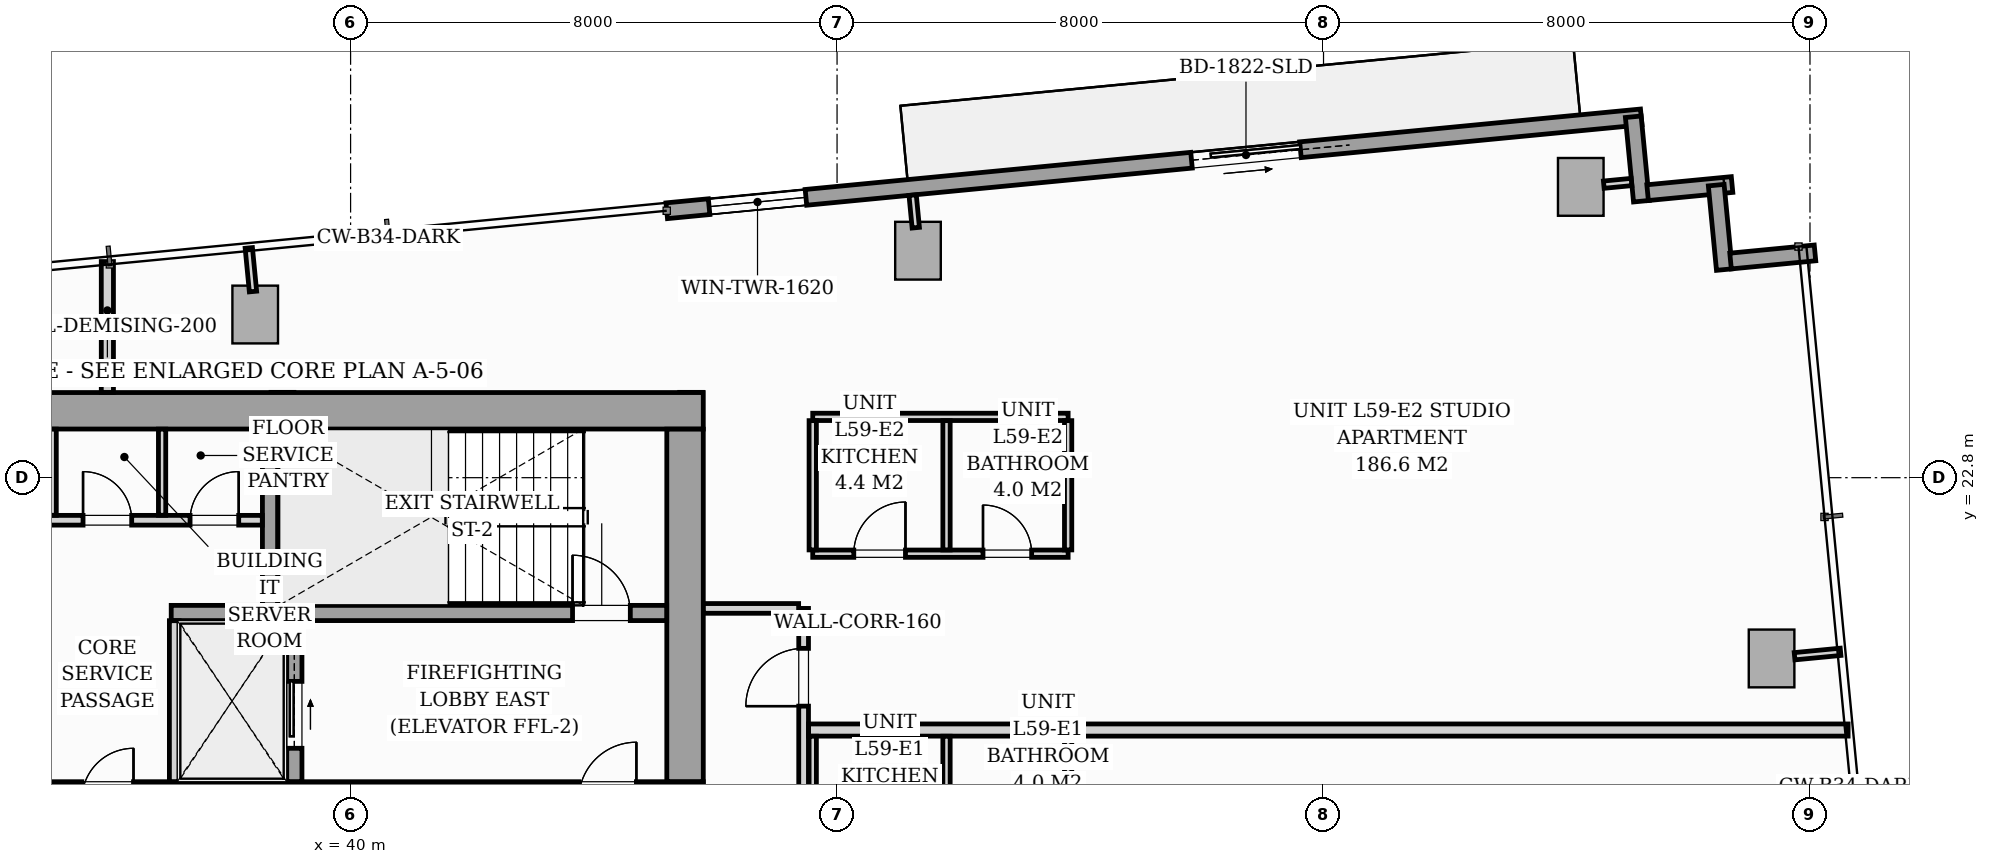
"""IFC4 building model, lengths in metres.
Left out: names, types, materials, properties, quantities, classifications, styles, units other than length and angle.
Written with IfcOpenShell. Run it as: python <this file> out.ifc"""

import sys

from ifc_helpers import new_model, si_unit, direction, frame, frame_2d, origin, origin_2d, place, context, subcontext, project, spatial, rectangle, i_section, extrude, source, transform, mapped, element, fill, save


model = new_model("IFC4")
c1 = context("Model", 3, precision=1e-05, world=origin(), true_north=direction((0.0, 1.0)))
c2 = subcontext(c1, "Body", "Model", "MODEL_VIEW")
j1 = project(units=[si_unit("LENGTHUNIT", "METRE"), si_unit("PLANEANGLEUNIT", "RADIAN")], contexts=[c1])
p1 = place(None, origin())
s1 = spatial("IfcSite", under=j1, at=p1, CompositionType="ELEMENT")
p2 = place(p1, origin())
s2 = spatial("IfcBuilding", under=s1, at=p2, CompositionType="ELEMENT")
p3 = place(p2, frame((0.0, 0.0, 205.0)))
s3 = spatial("IfcBuildingStorey", under=s2, at=p3, CompositionType="ELEMENT", Elevation=205.0)
m1 = source(origin(), c2, "Body", "SweptSolid", [
    extrude(i_section(OverallWidth=0.416, OverallDepth=0.446, WebThickness=0.039, FlangeThickness=0.063, FilletRadius=0.018, at=origin_2d()), origin(), (0.0, 0.0, 1.0), 3.196),
])
for number, where, z_axis, x_axis in (
    (1, (38.88, 24.0, 0.002), (0.0, 0.0, 1.0), (1.0, 0.0, 0.0)),
    (2, (45.6, 24.0, 0.002), (0.0, 0.0, 1.0), (1.0, 0.0, 0.0)),
):
    element("IfcColumn", number, at=place(p3, frame(where, z_axis=z_axis, x_axis=x_axis)), inside=s3, PredefinedType="PILASTER", context=c2, shape_type="MappedRepresentation", body=[
        mapped(m1, transform((0.0, 0.0, 0.0), scale=1.0)),
    ])
m2 = source(origin(), c2, "Body", "SweptSolid", [
    extrude(rectangle(XDim=0.75, YDim=0.95, at=origin_2d()), origin(), (0.0, 0.0, 1.0), 3.196),
])
for number, where, z_axis, x_axis in (
    (3, (38.431, 25.483, 0.002), (0.0, 0.0, 1.0), (0.995, 0.096, 0.0)),
    (4, (49.331, 26.533, 0.002), (0.0, 0.0, 1.0), (0.995, 0.096, 0.0)),
    (5, (60.23, 27.582, 0.002), (0.0, 0.0, 1.0), (0.995, 0.096, 0.0)),
    (6, (63.368, 19.827, 0.002), (0.0, 0.0, 1.0), (0.995, 0.096, 0.0)),
):
    element("IfcColumn", number, at=place(p3, frame(where, z_axis=z_axis, x_axis=x_axis)), inside=s3, PredefinedType="COLUMN", context=c2, shape_type="MappedRepresentation", body=[
        mapped(m2, transform((0.0, 0.0, 0.0), scale=1.0)),
    ])
p4 = place(p3, frame((45.199, 27.19, 0.0), z_axis=(0.0, 0.0, 1.0), x_axis=(0.995397074604, 0.095836652014, 0.0)))
e7 = element("IfcWall", 7, at=p4, inside=s3, PredefinedType="STANDARD", context=c2, shape_type="SweptSolid", body=[
    extrude(rectangle(XDim=16.1, YDim=0.26, at=frame_2d((8.05, 0.0))), origin(), (0.0, 0.0, 1.0), 2.94),
])
p5 = place(p4, frame((8.67, 0.0, 0.0)))
e8 = element("IfcOpeningElement", 8, at=p5, cuts=e7, PredefinedType="OPENING", context=c2, shape_type="SweptSolid", body=[
    extrude(rectangle(XDim=1.8, YDim=2.06, at=frame_2d((0.9, 1.03))), frame((0.0, 0.14, 0.0), z_axis=(0.0, -1.0, 0.0), x_axis=(1.0, 0.0, 0.0)), (0.0, 0.0, 1.0), 0.28),
])
p6 = place(p4, frame((0.7, 0.0, 0.65)))
e9 = element("IfcOpeningElement", 9, at=p6, cuts=e7, PredefinedType="OPENING", context=c2, shape_type="SweptSolid", body=[
    extrude(rectangle(XDim=1.6, YDim=1.5, at=frame_2d((0.8, 0.75))), frame((0.0, 0.14, 0.0), z_axis=(0.0, -1.0, 0.0), x_axis=(1.0, 0.0, 0.0)), (0.0, 0.0, 1.0), 0.28),
])
p7 = place(p3, frame((61.094, 28.735, 0.0), z_axis=(0.0, 0.0, 1.0), x_axis=(0.095742423056, -0.99540614245, 0.0)))
e10 = element("IfcWall", 10, at=p7, inside=s3, PredefinedType="STANDARD", context=c2, shape_type="SweptSolid", body=[
    extrude(rectangle(XDim=1.395, YDim=0.26, at=frame_2d((0.697, 0.0))), origin(), (0.0, 0.0, 1.0), 2.94),
])
p8 = place(p3, frame((61.33, 27.487, 0.0), z_axis=(0.0, 0.0, 1.0), x_axis=(0.995391056452, 0.09589913835, 0.0)))
e11 = element("IfcWall", 11, at=p8, inside=s3, PredefinedType="STANDARD", context=c2, shape_type="SweptSolid", body=[
    extrude(rectangle(XDim=1.395, YDim=0.26, at=frame_2d((0.698, 0.0))), origin(), (0.0, 0.0, 1.0), 2.94),
])
for number, where, z_axis, x_axis in (
    (12, (62.458, 27.611, 0.0), (0.0, 0.0, 1.0), (0.096, -0.995, 0.0)),
    (13, (62.694, 26.363, 0.0), (0.0, 0.0, 1.0), (0.995, 0.096, 0.0)),
):
    element("IfcWall", number, at=place(p3, frame(where, z_axis=z_axis, x_axis=x_axis)), inside=s3, PredefinedType="STANDARD", context=c2, shape_type="SweptSolid", body=[
        extrude(rectangle(XDim=1.395, YDim=0.26, at=frame_2d((0.697, 0.0))), origin(), (0.0, 0.0, 1.0), 2.94),
    ])
p9 = place(p3, frame((26.2, 17.5, 0.0), z_axis=(0.0, 0.0, 1.0), x_axis=(1.0, 0.0, 0.0)))
e14 = element("IfcWall", 14, at=p9, inside=s3, PredefinedType="SHEAR", context=c2, shape_type="SweptSolid", body=[
    extrude(rectangle(XDim=19.6, YDim=0.6, at=frame_2d((9.8, 0.0))), origin(), (0.0, 0.0, 1.0), 3.2),
])
p10 = place(p9, frame((0.95, 0.0, 0.0)))
e15 = element("IfcOpeningElement", 15, at=p10, cuts=e14, PredefinedType="OPENING", context=c2, shape_type="SweptSolid", body=[
    extrude(rectangle(XDim=0.95, YDim=2.06, at=frame_2d((0.475, 1.03))), frame((0.0, 0.31, 0.0), z_axis=(0.0, -1.0, 0.0), x_axis=(1.0, 0.0, 0.0)), (0.0, 0.0, 1.0), 0.62),
])
p11 = place(p9, frame((9.38, 0.0, 0.0)))
e16 = element("IfcOpeningElement", 16, at=p11, cuts=e14, PredefinedType="OPENING", context=c2, shape_type="SweptSolid", body=[
    extrude(rectangle(XDim=0.85, YDim=2.0, at=frame_2d((0.425, 1.0))), frame((0.0, 0.31, 0.0), z_axis=(0.0, -1.0, 0.0), x_axis=(1.0, 0.0, 0.0)), (0.0, 0.0, 1.0), 0.62),
])
p12 = place(p9, frame((17.55, 0.0, 0.0)))
e17 = element("IfcOpeningElement", 17, at=p12, cuts=e14, PredefinedType="OPENING", context=c2, shape_type="SweptSolid", body=[
    extrude(rectangle(XDim=0.95, YDim=2.06, at=frame_2d((0.475, 1.03))), frame((0.0, 0.31, 0.0), z_axis=(0.0, -1.0, 0.0), x_axis=(1.0, 0.0, 0.0)), (0.0, 0.0, 1.0), 0.62),
])
p13 = place(p3, frame((26.2, 23.9, 0.0), z_axis=(0.0, 0.0, 1.0), x_axis=(1.0, 0.0, 0.0)))
e18 = element("IfcWall", 18, at=p13, inside=s3, PredefinedType="SHEAR", context=c2, shape_type="SweptSolid", body=[
    extrude(rectangle(XDim=19.6, YDim=0.6, at=frame_2d((9.8, 0.0))), origin(), (0.0, 0.0, 1.0), 3.2),
])
p14 = place(p3, frame((45.5, 17.802, 0.0), z_axis=(0.0, 0.0, 1.0), x_axis=(0.0, 1.0, 0.0)))
e19 = element("IfcWall", 19, at=p14, inside=s3, PredefinedType="SHEAR", context=c2, shape_type="SweptSolid", body=[
    extrude(rectangle(XDim=5.796, YDim=0.6, at=frame_2d((2.898, 0.0))), origin(), (0.0, 0.0, 1.0), 3.2),
])
p15 = place(p3, frame((37.05, 20.575, 0.0), z_axis=(0.0, 0.0, 1.0), x_axis=(1.0, 0.0, 0.0)))
e20 = element("IfcWall", 20, at=p15, inside=s3, PredefinedType="SOLIDWALL", context=c2, shape_type="SweptSolid", body=[
    extrude(rectangle(XDim=8.148, YDim=0.25, at=frame_2d((4.074, 0.0))), origin(), (0.0, 0.0, 1.0), 3.2),
])
p16 = place(p15, frame((6.6, 0.0, 0.0)))
e21 = element("IfcOpeningElement", 21, at=p16, cuts=e20, PredefinedType="OPENING", context=c2, shape_type="SweptSolid", body=[
    extrude(rectangle(XDim=0.95, YDim=2.06, at=frame_2d((0.475, 1.03))), frame((0.0, 0.135, 0.0), z_axis=(0.0, -1.0, 0.0), x_axis=(1.0, 0.0, 0.0)), (0.0, 0.0, 1.0), 0.27),
])
p17 = place(p3, frame((38.675, 20.702, 0.0), z_axis=(0.0, 0.0, 1.0), x_axis=(0.0, 1.0, 0.0)))
e22 = element("IfcWall", 22, at=p17, inside=s3, PredefinedType="SOLIDWALL", context=c2, shape_type="SweptSolid", body=[
    extrude(rectangle(XDim=2.896, YDim=0.25, at=frame_2d((1.448, 0.0))), origin(), (0.0, 0.0, 1.0), 3.2),
])
p18 = place(p3, frame((37.1, 17.802, 0.0), z_axis=(0.0, 0.0, 1.0), x_axis=(0.0, 1.0, 0.0)))
e23 = element("IfcWall", 23, at=p18, inside=s3, PredefinedType="PARTITIONING", context=c2, shape_type="SweptSolid", body=[
    extrude(rectangle(XDim=2.646, YDim=0.16, at=frame_2d((1.323, 0.0))), origin(), (0.0, 0.0, 1.0), 2.94),
])
p19 = place(p3, frame((39.075, 17.802, 0.0), z_axis=(0.0, 0.0, 1.0), x_axis=(0.0, 1.0, 0.0)))
e24 = element("IfcWall", 24, at=p19, inside=s3, PredefinedType="SOLIDWALL", context=c2, shape_type="SweptSolid", body=[
    extrude(rectangle(XDim=2.646, YDim=0.25, at=frame_2d((1.323, 0.0))), origin(), (0.0, 0.0, 1.0), 3.2),
])
p20 = place(p19, frame((0.548, 0.0, 0.0)))
e25 = element("IfcOpeningElement", 25, at=p20, cuts=e24, PredefinedType="OPENING", context=c2, shape_type="SweptSolid", body=[
    extrude(rectangle(XDim=1.1, YDim=2.08, at=frame_2d((0.55, 1.04))), frame((0.0, 0.135, 0.0), z_axis=(0.0, -1.0, 0.0), x_axis=(1.0, 0.0, 0.0)), (0.0, 0.0, 1.0), 0.27),
])
p21 = place(p3, frame((33.452, 22.1, 0.0), z_axis=(0.0, 0.0, 1.0), x_axis=(1.0, 0.0, 0.0)))
e26 = element("IfcWall", 26, at=p21, inside=s3, PredefinedType="PARTITIONING", context=c2, shape_type="SweptSolid", body=[
    extrude(rectangle(XDim=5.096, YDim=0.16, at=frame_2d((2.548, 0.0))), origin(), (0.0, 0.0, 1.0), 2.94),
])
p22 = place(p21, frame((0.388, 0.0, 0.0)))
e27 = element("IfcOpeningElement", 27, at=p22, cuts=e26, PredefinedType="OPENING", context=c2, shape_type="SweptSolid", body=[
    extrude(rectangle(XDim=0.8, YDim=2.05, at=frame_2d((0.4, 1.025))), frame((0.0, 0.09, 0.0), z_axis=(0.0, -1.0, 0.0), x_axis=(1.0, 0.0, 0.0)), (0.0, 0.0, 1.0), 0.18),
])
p23 = place(p21, frame((2.148, 0.0, 0.0)))
e28 = element("IfcOpeningElement", 28, at=p23, cuts=e26, PredefinedType="OPENING", context=c2, shape_type="SweptSolid", body=[
    extrude(rectangle(XDim=0.8, YDim=2.05, at=frame_2d((0.4, 1.025))), frame((0.0, 0.09, 0.0), z_axis=(0.0, -1.0, 0.0), x_axis=(1.0, 0.0, 0.0)), (0.0, 0.0, 1.0), 0.18),
])
p24 = place(p21, frame((3.908, 0.0, 0.0)))
e29 = element("IfcOpeningElement", 29, at=p24, cuts=e26, PredefinedType="OPENING", context=c2, shape_type="SweptSolid", body=[
    extrude(rectangle(XDim=0.8, YDim=2.05, at=frame_2d((0.4, 1.025))), frame((0.0, 0.09, 0.0), z_axis=(0.0, -1.0, 0.0), x_axis=(1.0, 0.0, 0.0)), (0.0, 0.0, 1.0), 0.18),
])
for number, where, z_axis, x_axis in (
    (30, (35.1, 22.182, 0.0), (0.0, 0.0, 1.0), (0.0, 1.0, 0.0)),
    (31, (36.9, 22.182, 0.0), (0.0, 0.0, 1.0), (0.0, 1.0, 0.0)),
):
    element("IfcWall", number, at=place(p3, frame(where, z_axis=z_axis, x_axis=x_axis)), inside=s3, PredefinedType="PARTITIONING", context=c2, shape_type="SweptSolid", body=[
        extrude(rectangle(XDim=1.416, YDim=0.12, at=frame_2d((0.708, 0.0))), origin(), (0.0, 0.0, 1.0), 2.94),
    ])
p25 = place(p3, frame((47.45, 13.362, 0.0), z_axis=(0.0, 0.0, 1.0), x_axis=(0.0, 1.0, 0.0)))
e32 = element("IfcWall", 32, at=p25, inside=s3, PredefinedType="PARTITIONING", context=c2, shape_type="SweptSolid", body=[
    extrude(rectangle(XDim=7.288, YDim=0.16, at=frame_2d((3.644, 0.0))), origin(), (0.0, 0.0, 1.0), 2.94),
])
p26 = place(p25, frame((0.493, 0.0, 0.0)))
e33 = element("IfcOpeningElement", 33, at=p26, cuts=e32, PredefinedType="OPENING", context=c2, shape_type="SweptSolid", body=[
    extrude(rectangle(XDim=0.95, YDim=2.06, at=frame_2d((0.475, 1.03))), frame((0.0, 0.09, 0.0), z_axis=(0.0, -1.0, 0.0), x_axis=(1.0, 0.0, 0.0)), (0.0, 0.0, 1.0), 0.18),
])
p27 = place(p25, frame((5.681, 0.0, 0.0)))
e34 = element("IfcOpeningElement", 34, at=p27, cuts=e32, PredefinedType="OPENING", context=c2, shape_type="SweptSolid", body=[
    extrude(rectangle(XDim=0.95, YDim=2.06, at=frame_2d((0.475, 1.03))), frame((0.0, 0.09, 0.0), z_axis=(0.0, -1.0, 0.0), x_axis=(1.0, 0.0, 0.0)), (0.0, 0.0, 1.0), 0.18),
])
p28 = place(p3, frame((36.0, 24.202, 0.0), z_axis=(0.0, 0.0, 1.0), x_axis=(0.0, 1.0, 0.0)))
e35 = element("IfcWall", 35, at=p28, inside=s3, PredefinedType="PARTITIONING", context=c2, shape_type="SweptSolid", body=[
    extrude(rectangle(XDim=2.152, YDim=0.2, at=frame_2d((1.076, 0.0))), origin(), (0.0, 0.0, 1.0), 2.94),
])
p29 = place(p3, frame((45.802, 20.65, 0.0), z_axis=(0.0, 0.0, 1.0), x_axis=(1.0, 0.0, 0.0)))
e36 = element("IfcWall", 36, at=p29, inside=s3, PredefinedType="PARTITIONING", context=c2, shape_type="SweptSolid", body=[
    extrude(rectangle(XDim=1.566, YDim=0.16, at=frame_2d((0.783, 0.0))), origin(), (0.0, 0.0, 1.0), 2.94),
])
p30 = place(p3, frame((47.532, 18.65, 0.0), z_axis=(0.0, 0.0, 1.0), x_axis=(1.0, 0.0, 0.0)))
e37 = element("IfcWall", 37, at=p30, inside=s3, PredefinedType="PARTITIONING", context=c2, shape_type="SweptSolid", body=[
    extrude(rectangle(XDim=17.095, YDim=0.2, at=frame_2d((8.547, 0.0))), origin(), (0.0, 0.0, 1.0), 2.281),
])
for number, where, z_axis, x_axis in (
    (38, (47.6, 16.362, 0.0), (0.0, 0.0, 1.0), (0.0, 1.0, 0.0)),
    (39, (49.8, 16.362, 0.0), (0.0, 0.0, 1.0), (0.0, 1.0, 0.0)),
    (40, (51.8, 16.362, 0.0), (0.0, 0.0, 1.0), (0.0, 1.0, 0.0)),
):
    element("IfcWall", number, at=place(p3, frame(where, z_axis=z_axis, x_axis=x_axis)), inside=s3, PredefinedType="PARTITIONING", context=c2, shape_type="SweptSolid", body=[
        extrude(rectangle(XDim=2.186, YDim=0.12, at=frame_2d((1.093, 0.0))), origin(), (0.0, 0.0, 1.0), 2.94),
    ])
p31 = place(p3, frame((47.6, 21.55, 0.0), z_axis=(0.0, 0.0, 1.0), x_axis=(1.0, 0.0, 0.0)))
e41 = element("IfcWall", 41, at=p31, inside=s3, PredefinedType="PARTITIONING", context=c2, shape_type="SweptSolid", body=[
    extrude(rectangle(XDim=4.2, YDim=0.12, at=frame_2d((2.1, 0.0))), origin(), (0.0, 0.0, 1.0), 2.94),
])
p32 = place(p31, frame((0.675, 0.0, 0.0)))
e42 = element("IfcOpeningElement", 42, at=p32, cuts=e41, PredefinedType="OPENING", context=c2, shape_type="SweptSolid", body=[
    extrude(rectangle(XDim=0.85, YDim=2.05, at=frame_2d((0.425, 1.025))), frame((0.0, 0.07, 0.0), z_axis=(0.0, -1.0, 0.0), x_axis=(1.0, 0.0, 0.0)), (0.0, 0.0, 1.0), 0.14),
])
p33 = place(p31, frame((2.8, 0.0, 0.0)))
e43 = element("IfcOpeningElement", 43, at=p33, cuts=e41, PredefinedType="OPENING", context=c2, shape_type="SweptSolid", body=[
    extrude(rectangle(XDim=0.8, YDim=2.02, at=frame_2d((0.4, 1.01))), frame((0.0, 0.07, 0.0), z_axis=(0.0, -1.0, 0.0), x_axis=(1.0, 0.0, 0.0)), (0.0, 0.0, 1.0), 0.14),
])
p34 = place(p3, frame((47.6, 23.8, 0.0), z_axis=(0.0, 0.0, 1.0), x_axis=(1.0, 0.0, 0.0)))
e44 = element("IfcWall", 44, at=p34, inside=s3, PredefinedType="PARTITIONING", context=c2, shape_type="SweptSolid", body=[
    extrude(rectangle(XDim=4.2, YDim=0.12, at=frame_2d((2.1, 0.0))), origin(), (0.0, 0.0, 1.0), 2.94),
])
for number, where, z_axis, x_axis in (
    (45, (47.6, 21.612, 0.0), (0.0, 0.0, 1.0), (0.0, 1.0, 0.0)),
    (46, (49.8, 21.612, 0.0), (0.0, 0.0, 1.0), (0.0, 1.0, 0.0)),
    (47, (51.8, 21.612, 0.0), (0.0, 0.0, 1.0), (0.0, 1.0, 0.0)),
):
    element("IfcWall", number, at=place(p3, frame(where, z_axis=z_axis, x_axis=x_axis)), inside=s3, PredefinedType="PARTITIONING", context=c2, shape_type="SweptSolid", body=[
        extrude(rectangle(XDim=2.126, YDim=0.12, at=frame_2d((1.063, 0.0))), origin(), (0.0, 0.0, 1.0), 2.94),
    ])
p35 = place(p3, frame((38.395, 25.861, 0.0), z_axis=(0.0, 0.0, 1.0), x_axis=(-0.095977354523, 0.995383517755, 0.0)))
e48 = element("IfcWall", 48, at=p35, inside=s3, PredefinedType="PARTITIONING", context=c2, shape_type="SweptSolid", body=[
    extrude(rectangle(XDim=0.72, YDim=0.12, at=frame_2d((0.36, 0.0))), origin(), (0.0, 0.0, 1.0), 2.94),
])
p36 = place(p3, frame((49.294, 26.911, 0.0), z_axis=(0.0, 0.0, 1.0), x_axis=(-0.095772948675, 0.995403205893, 0.0)))
e49 = element("IfcWall", 49, at=p36, inside=s3, PredefinedType="PARTITIONING", context=c2, shape_type="SweptSolid", body=[
    extrude(rectangle(XDim=0.538, YDim=0.12, at=frame_2d((0.269, 0.0))), origin(), (0.0, 0.0, 1.0), 2.94),
])
p37 = place(p3, frame((60.609, 27.618, 0.0), z_axis=(0.0, 0.0, 1.0), x_axis=(0.995384576284, 0.09596637586, 0.0)))
e50 = element("IfcWall", 50, at=p37, inside=s3, PredefinedType="PARTITIONING", context=c2, shape_type="SweptSolid", body=[
    extrude(rectangle(XDim=0.458, YDim=0.12, at=frame_2d((0.229, 0.0))), origin(), (0.0, 0.0, 1.0), 2.94),
])
p38 = place(p3, frame((63.747, 19.864, 0.0), z_axis=(0.0, 0.0, 1.0), x_axis=(0.995405496295, 0.095749140702, 0.0)))
e51 = element("IfcWall", 51, at=p38, inside=s3, PredefinedType="PARTITIONING", context=c2, shape_type="SweptSolid", body=[
    extrude(rectangle(XDim=0.76, YDim=0.12, at=frame_2d((0.38, 0.0))), origin(), (0.0, 0.0, 1.0), 2.94),
])
m3 = source(origin(), c2, "Body", "SweptSolid", [
    extrude(rectangle(XDim=1.8, YDim=2.06, at=frame_2d((0.9, 1.03))), frame((0.0, 0.025, 0.0), z_axis=(0.0, -1.0, 0.0), x_axis=(1.0, 0.0, 0.0)), (0.0, 0.0, 1.0), 0.05),
])
p39 = place(p5, origin())
e52 = element("IfcDoor", 52, at=p39, inside=s3, OperationType="SLIDING_TO_RIGHT", PredefinedType="DOOR", context=c2, shape_type="MappedRepresentation", body=[
    mapped(m3, transform((0.0, 0.0, 0.0), scale=1.0)),
])
fill(e8, e52)
m4 = source(origin(), c2, "Body", "SweptSolid", [
    extrude(rectangle(XDim=1.6, YDim=1.5, at=frame_2d((0.8, 0.75))), frame((0.0, 0.03, 0.0), z_axis=(0.0, -1.0, 0.0), x_axis=(1.0, 0.0, 0.0)), (0.0, 0.0, 1.0), 0.06),
])
p40 = place(p6, origin())
e53 = element("IfcWindow", 53, at=p40, inside=s3, PartitioningType="SINGLE_PANEL", PredefinedType="WINDOW", context=c2, shape_type="MappedRepresentation", body=[
    mapped(m4, transform((0.0, 0.0, 0.0), scale=1.0)),
])
fill(e9, e53)
m5 = source(origin(), c2, "Body", "SweptSolid", [
    extrude(rectangle(XDim=0.95, YDim=2.06, at=frame_2d((0.475, 1.03))), frame((0.0, 0.025, 0.0), z_axis=(0.0, -1.0, 0.0), x_axis=(1.0, 0.0, 0.0)), (0.0, 0.0, 1.0), 0.05),
])
p41 = place(p16, origin())
e54 = element("IfcDoor", 54, at=p41, inside=s3, OperationType="SINGLE_SWING_LEFT", PredefinedType="DOOR", context=c2, shape_type="MappedRepresentation", body=[
    mapped(m5, transform((0.0, 0.0, 0.0), scale=1.0)),
])
fill(e21, e54)
m6 = source(origin(), c2, "Body", "SweptSolid", [
    extrude(rectangle(XDim=1.1, YDim=2.08, at=frame_2d((0.55, 1.04))), frame((0.0, 0.025, 0.0), z_axis=(0.0, -1.0, 0.0), x_axis=(1.0, 0.0, 0.0)), (0.0, 0.0, 1.0), 0.05),
])
p42 = place(p20, origin())
e55 = element("IfcDoor", 55, at=p42, inside=s3, OperationType="SLIDING_TO_RIGHT", PredefinedType="DOOR", context=c2, shape_type="MappedRepresentation", body=[
    mapped(m6, transform((0.0, 0.0, 0.0), scale=1.0)),
])
fill(e25, e55)
m7 = source(origin(), c2, "Body", "SweptSolid", [
    extrude(rectangle(XDim=0.8, YDim=2.05, at=frame_2d((0.4, 1.025))), frame((0.0, 0.025, 0.0), z_axis=(0.0, -1.0, 0.0), x_axis=(1.0, 0.0, 0.0)), (0.0, 0.0, 1.0), 0.05),
])
p43 = place(p23, origin())
e56 = element("IfcDoor", 56, at=p43, inside=s3, OperationType="SINGLE_SWING_LEFT", PredefinedType="DOOR", context=c2, shape_type="MappedRepresentation", body=[
    mapped(m7, transform((0.0, 0.0, 0.0), scale=1.0)),
])
fill(e28, e56)
p44 = place(p24, origin())
e57 = element("IfcDoor", 57, at=p44, inside=s3, OperationType="SINGLE_SWING_RIGHT", PredefinedType="DOOR", context=c2, shape_type="MappedRepresentation", body=[
    mapped(m7, transform((0.0, 0.0, 0.0), scale=1.0)),
])
fill(e29, e57)
m8 = source(origin(), c2, "Body", "SweptSolid", [
    extrude(rectangle(XDim=0.95, YDim=2.06, at=frame_2d((0.475, 1.03))), frame((0.0, 0.025, 0.0), z_axis=(0.0, -1.0, 0.0), x_axis=(1.0, 0.0, 0.0)), (0.0, 0.0, 1.0), 0.05),
])
p45 = place(p27, origin())
e58 = element("IfcDoor", 58, at=p45, inside=s3, OperationType="SINGLE_SWING_LEFT", PredefinedType="DOOR", context=c2, shape_type="MappedRepresentation", body=[
    mapped(m8, transform((0.0, 0.0, 0.0), scale=1.0)),
])
fill(e34, e58)
m9 = source(origin(), c2, "Body", "SweptSolid", [
    extrude(rectangle(XDim=0.85, YDim=2.05, at=frame_2d((0.425, 1.025))), frame((0.0, 0.025, 0.0), z_axis=(0.0, -1.0, 0.0), x_axis=(1.0, 0.0, 0.0)), (0.0, 0.0, 1.0), 0.05),
])
p46 = place(p32, origin())
e59 = element("IfcDoor", 59, at=p46, inside=s3, OperationType="SINGLE_SWING_RIGHT", PredefinedType="DOOR", context=c2, shape_type="MappedRepresentation", body=[
    mapped(m9, transform((0.0, 0.0, 0.0), scale=1.0)),
])
fill(e42, e59)
m10 = source(origin(), c2, "Body", "SweptSolid", [
    extrude(rectangle(XDim=0.8, YDim=2.02, at=frame_2d((0.4, 1.01))), frame((0.0, 0.025, 0.0), z_axis=(0.0, -1.0, 0.0), x_axis=(1.0, 0.0, 0.0)), (0.0, 0.0, 1.0), 0.05),
])
p47 = place(p33, origin())
e60 = element("IfcDoor", 60, at=p47, inside=s3, OperationType="SINGLE_SWING_LEFT", PredefinedType="DOOR", context=c2, shape_type="MappedRepresentation", body=[
    mapped(m10, transform((0.0, 0.0, 0.0), scale=1.0)),
])
fill(e43, e60)
save(model, sys.argv[1])
